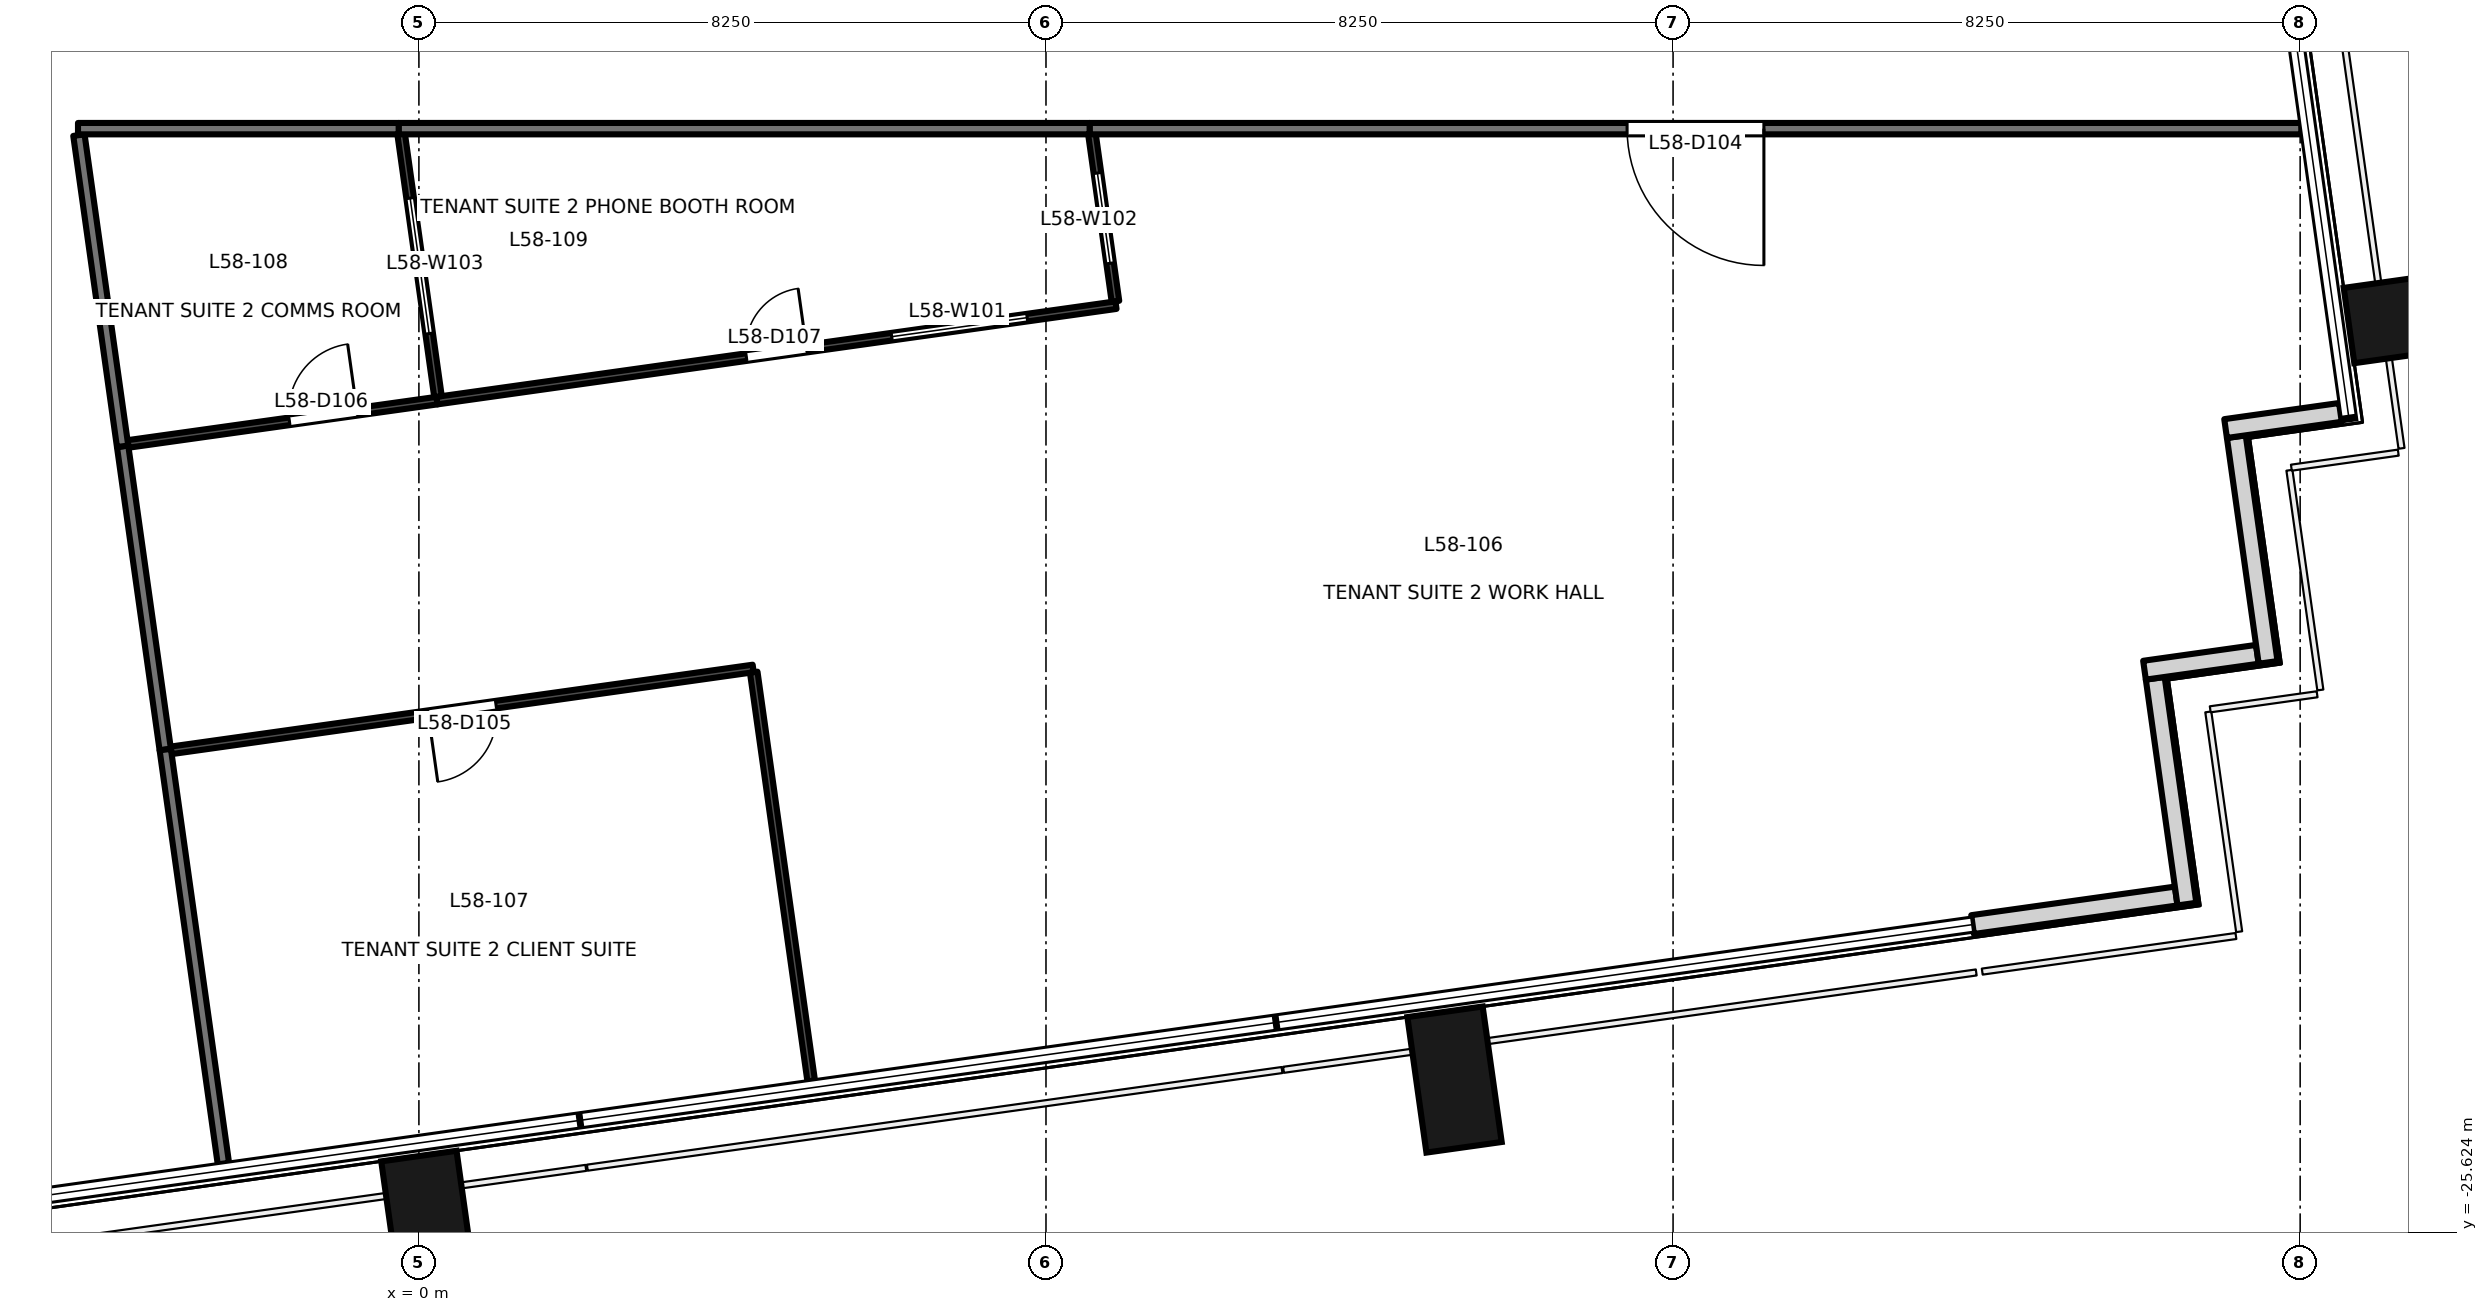
"""IFC4 building model, lengths in metres.
Left out: names, types, materials, properties, quantities, classifications, styles, units other than length and angle.
Written with IfcOpenShell. Run it as: python <this file> out.ifc"""

import sys

from ifc_helpers import new_model, si_unit, direction, frame, frame_2d, origin, origin_2d, place, context, subcontext, project, spatial, rectangle, extrude, element, fill, save


model = new_model("IFC4")
c1 = context("Model", 3, precision=1e-05, world=origin(), true_north=direction((0.0, 1.0)))
c2 = subcontext(c1, "Body", "Model", "MODEL_VIEW")
j1 = project(units=[si_unit("LENGTHUNIT", "METRE"), si_unit("PLANEANGLEUNIT", "RADIAN")], contexts=[c1])
p1 = place(None, origin())
s1 = spatial("IfcSite", under=j1, at=p1, CompositionType="ELEMENT")
p2 = place(p1, origin())
s2 = spatial("IfcBuilding", under=s1, at=p2, CompositionType="ELEMENT")
p3 = place(p2, frame((0.0, 0.0, 255.1)))
s3 = spatial("IfcBuildingStorey", under=s2, at=p3, CompositionType="ELEMENT", Elevation=255.1)
for number, where, z_axis, x_axis in (
    (1, (0.125, -25.508, -0.2), (0.0, 0.0, 1.0), (0.99, 0.139, 0.0)),
    (2, (13.625, -23.61, -0.2), (0.0, 0.0, 1.0), (0.99, 0.139, 0.0)),
    (3, (26.284, -13.565, -0.2), (0.0, 0.0, 1.0), (-0.139, 0.99, 0.0)),
):
    element("IfcColumn", number, at=place(p3, frame(where, z_axis=z_axis, x_axis=x_axis)), inside=s3, PredefinedType="COLUMN", context=c2, shape_type="SweptSolid", body=[
        extrude(rectangle(XDim=1.0, YDim=1.8, at=origin_2d()), origin(), (0.0, 0.0, 1.0), 3.9),
    ])
p4 = place(p3, frame((20.44, -21.572, 0.0), z_axis=(0.0, 0.0, 1.0), x_axis=(0.990293105353, 0.138994839796, 0.0)))
e4 = element("IfcWall", 4, at=p4, inside=s3, PredefinedType="SOLIDWALL", context=c2, shape_type="SweptSolid", body=[
    extrude(rectangle(XDim=2.705, YDim=0.25, at=frame_2d((1.353, 0.0))), origin(), (0.0, 0.0, 1.0), 3.7),
])
p5 = place(p3, frame((23.26, -21.302, 0.0), z_axis=(0.0, 0.0, 1.0), x_axis=(-0.138994228812, 0.990293191109, 0.0)))
e5 = element("IfcWall", 5, at=p5, inside=s3, PredefinedType="SOLIDWALL", context=c2, shape_type="SweptSolid", body=[
    extrude(rectangle(XDim=3.0, YDim=0.25, at=frame_2d((1.5, 0.0))), origin(), (0.0, 0.0, 1.0), 3.7),
])
p6 = place(p3, frame((22.702, -18.225, 0.0), z_axis=(0.0, 0.0, 1.0), x_axis=(0.990243596651, 0.13934711799, 0.0)))
e6 = element("IfcWall", 6, at=p6, inside=s3, PredefinedType="SOLIDWALL", context=c2, shape_type="SweptSolid", body=[
    extrude(rectangle(XDim=1.5, YDim=0.25, at=frame_2d((0.75, 0.0))), origin(), (0.0, 0.0, 1.0), 3.7),
])
p7 = place(p3, frame((24.328, -18.122, 0.0), z_axis=(0.0, 0.0, 1.0), x_axis=(-0.139358350296, 0.990242015975, 0.0)))
e7 = element("IfcWall", 7, at=p7, inside=s3, PredefinedType="SOLIDWALL", context=c2, shape_type="SweptSolid", body=[
    extrude(rectangle(XDim=2.999, YDim=0.25, at=frame_2d((1.5, 0.0))), origin(), (0.0, 0.0, 1.0), 3.7),
])
p8 = place(p3, frame((23.769, -15.046, 0.0), z_axis=(0.0, 0.0, 1.0), x_axis=(0.990260716096, 0.139225407725, 0.0)))
e8 = element("IfcWall", 8, at=p8, inside=s3, PredefinedType="SOLIDWALL", context=c2, shape_type="SweptSolid", body=[
    extrude(rectangle(XDim=1.526, YDim=0.25, at=frame_2d((0.763, 0.0))), origin(), (0.0, 0.0, 1.0), 3.7),
])
p9 = place(p3, frame((-3.898, -15.279, 0.0), z_axis=(0.0, 0.0, 1.0), x_axis=(0.139240905476, -0.990258537071, 0.0)))
e9 = element("IfcWall", 9, at=p9, inside=s3, PredefinedType="PARTITIONING", context=c2, shape_type="SweptSolid", body=[
    extrude(rectangle(XDim=4.029, YDim=0.15, at=frame_2d((2.015, 0.0))), origin(), (0.0, 0.0, 1.0), 3.7),
])
p10 = place(p3, frame((24.765, -11.1, 0.0), z_axis=(0.0, 0.0, 1.0), x_axis=(-1.0, 0.0, 0.0)))
e10 = element("IfcWall", 10, at=p10, inside=s3, PredefinedType="PARTITIONING", context=c2, shape_type="SweptSolid", body=[
    extrude(rectangle(XDim=15.941, YDim=0.15, at=frame_2d((7.97, 0.0))), origin(), (0.0, 0.0, 1.0), 3.0),
])
p11 = place(p10, frame((7.07, 0.0, 0.0)))
e11 = element("IfcOpeningElement", 11, at=p11, cuts=e10, PredefinedType="OPENING", context=c2, shape_type="SweptSolid", body=[
    extrude(rectangle(XDim=1.8, YDim=2.1, at=frame_2d((0.9, 1.05))), frame((0.0, 0.085, 0.0), z_axis=(0.0, -1.0, 0.0), x_axis=(1.0, 0.0, 0.0)), (0.0, 0.0, 1.0), 0.171),
])
p12 = place(p3, frame((-3.337, -19.269, 0.0), z_axis=(0.0, 0.0, 1.0), x_axis=(0.139059647431, -0.990284006968, 0.0)))
e12 = element("IfcWall", 12, at=p12, inside=s3, PredefinedType="PARTITIONING", context=c2, shape_type="SweptSolid", body=[
    extrude(rectangle(XDim=5.5, YDim=0.15, at=frame_2d((2.75, 0.0))), origin(), (0.0, 0.0, 1.0), 3.7),
])
p13 = place(p3, frame((-4.473, -11.185, 0.0), z_axis=(0.0, 0.0, 1.0), x_axis=(0.1390729581, -0.990282137739, 0.0)))
e13 = element("IfcWall", 13, at=p13, inside=s3, PredefinedType="PARTITIONING", context=c2, shape_type="SweptSolid", body=[
    extrude(rectangle(XDim=4.134, YDim=0.15, at=frame_2d((2.067, 0.0))), origin(), (0.0, 0.0, 1.0), 2.8),
])
p14 = place(p3, frame((-0.264, -11.1, 0.0), z_axis=(0.0, 0.0, 1.0), x_axis=(-1.0, 0.0, 0.0)))
e14 = element("IfcWall", 14, at=p14, inside=s3, PredefinedType="PARTITIONING", context=c2, shape_type="SweptSolid", body=[
    extrude(rectangle(XDim=4.221, YDim=0.15, at=frame_2d((2.111, 0.0))), origin(), (0.0, 0.0, 1.0), 2.8),
])
p15 = place(p3, frame((8.824, -11.1, 0.0), z_axis=(0.0, 0.0, 1.0), x_axis=(-1.0, 0.0, 0.0)))
e15 = element("IfcWall", 15, at=p15, inside=s3, PredefinedType="PARTITIONING", context=c2, shape_type="SweptSolid", body=[
    extrude(rectangle(XDim=9.088, YDim=0.15, at=frame_2d((4.544, 0.0))), origin(), (0.0, 0.0, 1.0), 2.9),
])
p16 = place(p3, frame((4.398, -18.202, 0.0), z_axis=(0.0, 0.0, 1.0), x_axis=(-0.990252156894, -0.139286272714, 0.0)))
e16 = element("IfcWall", 16, at=p16, inside=s3, PredefinedType="PARTITIONING", context=c2, shape_type="SweptSolid", body=[
    extrude(rectangle(XDim=7.733, YDim=0.1, at=frame_2d((3.867, 0.0))), origin(), (0.0, 0.0, 1.0), 2.9),
])
p17 = place(p16, frame((3.417, 0.0, 0.0)))
e17 = element("IfcOpeningElement", 17, at=p17, cuts=e16, PredefinedType="OPENING", context=c2, shape_type="SweptSolid", body=[
    extrude(rectangle(XDim=0.9, YDim=2.1, at=frame_2d((0.45, 1.05))), frame((0.0, 0.061, 0.0), z_axis=(0.0, -1.0, 0.0), x_axis=(1.0, 0.0, 0.0)), (0.0, 0.0, 1.0), 0.121),
])
p18 = place(p3, frame((5.161, -23.628, 0.0), z_axis=(0.0, 0.0, 1.0), x_axis=(-0.139205228836, 0.990263552932, 0.0)))
e18 = element("IfcWall", 18, at=p18, inside=s3, PredefinedType="PARTITIONING", context=c2, shape_type="SweptSolid", body=[
    extrude(rectangle(XDim=5.43, YDim=0.1, at=frame_2d((2.715, 0.0))), origin(), (0.0, 0.0, 1.0), 2.9),
])
p19 = place(p3, frame((-3.826, -15.248, 0.0), z_axis=(0.0, 0.0, 1.0), x_axis=(0.990304461309, 0.138913908276, 0.0)))
e19 = element("IfcWall", 19, at=p19, inside=s3, PredefinedType="PARTITIONING", context=c2, shape_type="SweptSolid", body=[
    extrude(rectangle(XDim=4.104, YDim=0.1, at=frame_2d((2.052, 0.0))), origin(), (0.0, 0.0, 1.0), 2.9),
])
p20 = place(p19, frame((2.143, 0.0, 0.0)))
e20 = element("IfcOpeningElement", 20, at=p20, cuts=e19, PredefinedType="OPENING", context=c2, shape_type="SweptSolid", body=[
    extrude(rectangle(XDim=0.9, YDim=2.1, at=frame_2d((0.45, 1.05))), frame((0.0, 0.061, 0.0), z_axis=(0.0, -1.0, 0.0), x_axis=(1.0, 0.0, 0.0)), (0.0, 0.0, 1.0), 0.121),
])
p21 = place(p3, frame((0.238, -14.678, 0.0), z_axis=(0.0, 0.0, 1.0), x_axis=(0.990261534953, 0.139219583367, 0.0)))
e21 = element("IfcWall", 21, at=p21, inside=s3, PredefinedType="PARTITIONING", context=c2, shape_type="SweptSolid", body=[
    extrude(rectangle(XDim=9.021, YDim=0.1, at=frame_2d((4.51, 0.0))), origin(), (0.0, 0.0, 1.0), 2.9),
])
p22 = place(p21, frame((4.11, 0.0, 0.0)))
e22 = element("IfcOpeningElement", 22, at=p22, cuts=e21, PredefinedType="OPENING", context=c2, shape_type="SweptSolid", body=[
    extrude(rectangle(XDim=0.8, YDim=2.1, at=frame_2d((0.4, 1.05))), frame((0.0, 0.061, 0.0), z_axis=(0.0, -1.0, 0.0), x_axis=(1.0, 0.0, 0.0)), (0.0, 0.0, 1.0), 0.121),
])
p23 = place(p21, frame((6.041, 0.0, 0.9)))
e23 = element("IfcOpeningElement", 23, at=p23, cuts=e21, PredefinedType="OPENING", context=c2, shape_type="SweptSolid", body=[
    extrude(rectangle(XDim=1.8, YDim=1.2, at=frame_2d((0.9, 0.6))), frame((0.0, 0.061, 0.0), z_axis=(0.0, -1.0, 0.0), x_axis=(1.0, 0.0, 0.0)), (0.0, 0.0, 1.0), 0.121),
])
p24 = place(p3, frame((9.164, -13.372, 0.0), z_axis=(0.0, 0.0, 1.0), x_axis=(-0.139301888521, 0.99024996029, 0.0)))
e24 = element("IfcWall", 24, at=p24, inside=s3, PredefinedType="PARTITIONING", context=c2, shape_type="SweptSolid", body=[
    extrude(rectangle(XDim=2.226, YDim=0.1, at=frame_2d((1.113, 0.0))), origin(), (0.0, 0.0, 1.0), 3.0),
])
p25 = place(p24, frame((0.505, 0.0, 0.9)))
e25 = element("IfcOpeningElement", 25, at=p25, cuts=e24, PredefinedType="OPENING", context=c2, shape_type="SweptSolid", body=[
    extrude(rectangle(XDim=1.2, YDim=1.2, at=frame_2d((0.6, 0.6))), frame((0.0, 0.061, 0.0), z_axis=(0.0, -1.0, 0.0), x_axis=(1.0, 0.0, 0.0)), (0.0, 0.0, 1.0), 0.121),
])
p26 = place(p3, frame((-0.234, -11.168, 0.0), z_axis=(0.0, 0.0, 1.0), x_axis=(0.138894773338, -0.990307145253, 0.0)))
e26 = element("IfcWall", 26, at=p26, inside=s3, PredefinedType="PARTITIONING", context=c2, shape_type="SweptSolid", body=[
    extrude(rectangle(XDim=3.491, YDim=0.1, at=frame_2d((1.746, 0.0))), origin(), (0.0, 0.0, 1.0), 2.9),
])
p27 = place(p26, frame((0.854, 0.0, 0.9)))
e27 = element("IfcOpeningElement", 27, at=p27, cuts=e26, PredefinedType="OPENING", context=c2, shape_type="SweptSolid", body=[
    extrude(rectangle(XDim=1.8, YDim=1.2, at=frame_2d((0.9, 0.6))), frame((0.0, 0.061, 0.0), z_axis=(0.0, -1.0, 0.0), x_axis=(1.0, 0.0, 0.0)), (0.0, 0.0, 1.0), 0.121),
])
p28 = place(p11, origin())
e28 = element("IfcDoor", 28, at=p28, inside=s3, OperationType="DOUBLE_DOOR_SINGLE_SWING", PredefinedType="DOOR", context=c2, shape_type="SweptSolid", body=[
    extrude(rectangle(XDim=1.8, YDim=2.1, at=frame_2d((0.9, 1.05))), frame((0.0, 0.025, 0.0), z_axis=(0.0, -1.0, 0.0), x_axis=(1.0, 0.0, 0.0)), (0.0, 0.0, 1.0), 0.05),
])
fill(e11, e28)
p29 = place(p17, origin())
e29 = element("IfcDoor", 29, at=p29, inside=s3, OperationType="SINGLE_SWING_RIGHT", PredefinedType="DOOR", context=c2, shape_type="SweptSolid", body=[
    extrude(rectangle(XDim=0.9, YDim=2.1, at=frame_2d((0.45, 1.05))), frame((0.0, 0.025, 0.0), z_axis=(0.0, -1.0, 0.0), x_axis=(1.0, 0.0, 0.0)), (0.0, 0.0, 1.0), 0.05),
])
fill(e17, e29)
p30 = place(p20, origin())
e30 = element("IfcDoor", 30, at=p30, inside=s3, OperationType="SINGLE_SWING_RIGHT", PredefinedType="DOOR", context=c2, shape_type="SweptSolid", body=[
    extrude(rectangle(XDim=0.9, YDim=2.1, at=frame_2d((0.45, 1.05))), frame((0.0, 0.025, 0.0), z_axis=(0.0, -1.0, 0.0), x_axis=(1.0, 0.0, 0.0)), (0.0, 0.0, 1.0), 0.05),
])
fill(e20, e30)
p31 = place(p22, origin())
e31 = element("IfcDoor", 31, at=p31, inside=s3, OperationType="SINGLE_SWING_RIGHT", PredefinedType="DOOR", context=c2, shape_type="SweptSolid", body=[
    extrude(rectangle(XDim=0.8, YDim=2.1, at=frame_2d((0.4, 1.05))), frame((0.0, 0.025, 0.0), z_axis=(0.0, -1.0, 0.0), x_axis=(1.0, 0.0, 0.0)), (0.0, 0.0, 1.0), 0.05),
])
fill(e22, e31)
p32 = place(p23, origin())
e32 = element("IfcWindow", 32, at=p32, inside=s3, PartitioningType="SINGLE_PANEL", PredefinedType="WINDOW", context=c2, shape_type="SweptSolid", body=[
    extrude(rectangle(XDim=1.8, YDim=1.2, at=frame_2d((0.9, 0.6))), frame((0.0, 0.03, 0.0), z_axis=(0.0, -1.0, 0.0), x_axis=(1.0, 0.0, 0.0)), (0.0, 0.0, 1.0), 0.06),
])
fill(e23, e32)
p33 = place(p25, origin())
e33 = element("IfcWindow", 33, at=p33, inside=s3, PartitioningType="SINGLE_PANEL", PredefinedType="WINDOW", context=c2, shape_type="SweptSolid", body=[
    extrude(rectangle(XDim=1.2, YDim=1.2, at=frame_2d((0.6, 0.6))), frame((0.0, 0.03, 0.0), z_axis=(0.0, -1.0, 0.0), x_axis=(1.0, 0.0, 0.0)), (0.0, 0.0, 1.0), 0.06),
])
fill(e25, e33)
p34 = place(p27, origin())
e34 = element("IfcWindow", 34, at=p34, inside=s3, PartitioningType="SINGLE_PANEL", PredefinedType="WINDOW", context=c2, shape_type="SweptSolid", body=[
    extrude(rectangle(XDim=1.8, YDim=1.2, at=frame_2d((0.9, 0.6))), frame((0.0, 0.03, 0.0), z_axis=(0.0, -1.0, 0.0), x_axis=(1.0, 0.0, 0.0)), (0.0, 0.0, 1.0), 0.06),
])
fill(e27, e34)
save(model, sys.argv[1])
